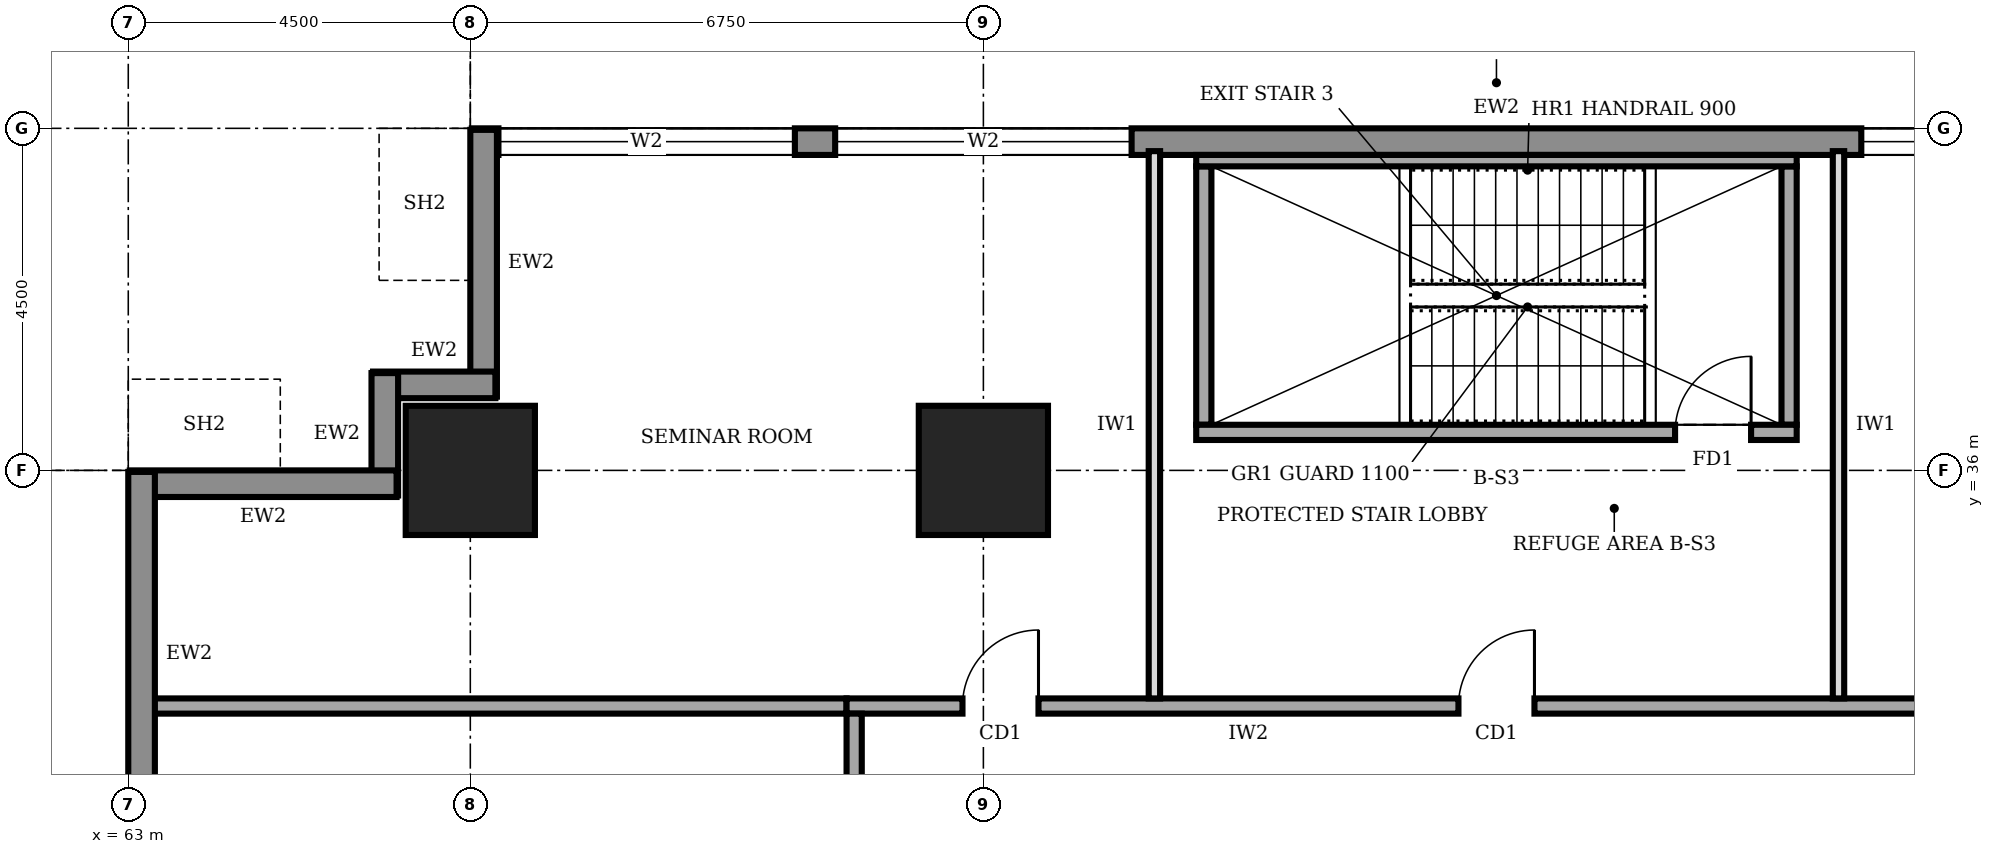
"""IFC4 building model, lengths in metres.
Left out: names, types, materials, properties, quantities, classifications, styles, units other than length and angle.
Written with IfcOpenShell. Run it as: python <this file> out.ifc"""

import sys

from ifc_helpers import new_model, si_unit, direction, frame, frame_2d, origin, origin_2d, place, context, subcontext, project, spatial, rectangle, extrude, element, fill, save


model = new_model("IFC4")
c1 = context("Model", 3, precision=1e-05, world=origin(), true_north=direction((0.0, 1.0)))
c2 = subcontext(c1, "Body", "Model", "MODEL_VIEW")
j1 = project(units=[si_unit("LENGTHUNIT", "METRE"), si_unit("PLANEANGLEUNIT", "RADIAN")], contexts=[c1])
p1 = place(None, origin())
s1 = spatial("IfcSite", under=j1, at=p1, CompositionType="ELEMENT")
p2 = place(p1, origin())
s2 = spatial("IfcBuilding", under=s1, at=p2, CompositionType="ELEMENT")
p3 = place(p2, frame((0.0, 0.0, 69.0)))
s3 = spatial("IfcBuildingStorey", under=s2, at=p3, CompositionType="ELEMENT", Elevation=69.0)
for number, where, z_axis, x_axis in (
    (1, (67.5, 36.0, 0.0), (0.0, 0.0, 1.0), (1.0, 0.0, 0.0)),
    (2, (74.25, 36.0, 0.0), (0.0, 0.0, 1.0), (1.0, 0.0, 0.0)),
):
    element("IfcColumn", number, at=place(p3, frame(where, z_axis=z_axis, x_axis=x_axis)), inside=s3, PredefinedType="COLUMN", context=c2, shape_type="SweptSolid", body=[
        extrude(rectangle(XDim=1.7, YDim=1.7, at=origin_2d()), origin(), (0.0, 0.0, 1.0), 4.0),
    ])
p4 = place(p3, frame((94.48, 40.325, 0.0), z_axis=(0.0, 0.0, 1.0), x_axis=(-1.0, 0.0, 0.0)))
e3 = element("IfcWall", 3, at=p4, inside=s3, PredefinedType="STANDARD", context=c2, shape_type="SweptSolid", body=[
    extrude(rectangle(XDim=26.96, YDim=0.35, at=frame_2d((13.48, 0.0))), origin(), (0.0, 0.0, 1.0), 3.75),
])
p5 = place(p4, frame((22.71, 0.0, 0.6)))
e4 = element("IfcOpeningElement", 4, at=p5, cuts=e3, PredefinedType="OPENING", context=c2, shape_type="SweptSolid", body=[
    extrude(rectangle(XDim=3.9, YDim=2.6, at=frame_2d((1.95, 1.3))), frame((0.0, 0.185, 0.0), z_axis=(0.0, -1.0, 0.0), x_axis=(1.0, 0.0, 0.0)), (0.0, 0.0, 1.0), 0.37),
])
p6 = place(p4, frame((18.28, 0.0, 0.6)))
e5 = element("IfcOpeningElement", 5, at=p6, cuts=e3, PredefinedType="OPENING", context=c2, shape_type="SweptSolid", body=[
    extrude(rectangle(XDim=3.9, YDim=2.6, at=frame_2d((1.95, 1.3))), frame((0.0, 0.185, 0.0), z_axis=(0.0, -1.0, 0.0), x_axis=(1.0, 0.0, 0.0)), (0.0, 0.0, 1.0), 0.37),
])
p7 = place(p4, frame((4.78, 0.0, 0.6)))
e6 = element("IfcOpeningElement", 6, at=p7, cuts=e3, PredefinedType="OPENING", context=c2, shape_type="SweptSolid", body=[
    extrude(rectangle(XDim=3.9, YDim=2.6, at=frame_2d((1.95, 1.3))), frame((0.0, 0.185, 0.0), z_axis=(0.0, -1.0, 0.0), x_axis=(1.0, 0.0, 0.0)), (0.0, 0.0, 1.0), 0.37),
])
p8 = place(p3, frame((67.675, 40.48, 0.0), z_axis=(0.0, 0.0, 1.0), x_axis=(0.0, -1.0, 0.0)))
e7 = element("IfcWall", 7, at=p8, inside=s3, PredefinedType="STANDARD", context=c2, shape_type="SweptSolid", body=[
    extrude(rectangle(XDim=3.51, YDim=0.35, at=frame_2d((1.755, 0.0))), origin(), (0.0, 0.0, 1.0), 2.85),
])
for number, where, z_axis, x_axis in (
    (8, (67.83, 37.125, 0.0), (0.0, 0.0, 1.0), (-1.0, 0.0, 0.0)),
    (9, (66.375, 37.28, 0.0), (0.0, 0.0, 1.0), (0.0, -1.0, 0.0)),
):
    element("IfcWall", number, at=place(p3, frame(where, z_axis=z_axis, x_axis=x_axis)), inside=s3, PredefinedType="STANDARD", context=c2, shape_type="SweptSolid", body=[
        extrude(rectangle(XDim=1.61, YDim=0.35, at=frame_2d((0.805, 0.0))), origin(), (0.0, 0.0, 1.0), 3.75),
    ])
p9 = place(p3, frame((66.53, 35.825, 0.0), z_axis=(0.0, 0.0, 1.0), x_axis=(-1.0, 0.0, 0.0)))
e10 = element("IfcWall", 10, at=p9, inside=s3, PredefinedType="STANDARD", context=c2, shape_type="SweptSolid", body=[
    extrude(rectangle(XDim=3.51, YDim=0.35, at=frame_2d((1.755, 0.0))), origin(), (0.0, 0.0, 1.0), 2.85),
])
p10 = place(p3, frame((63.175, 35.98, 0.0), z_axis=(0.0, 0.0, 1.0), x_axis=(0.0, -1.0, 0.0)))
e11 = element("IfcWall", 11, at=p10, inside=s3, PredefinedType="STANDARD", context=c2, shape_type="SweptSolid", body=[
    extrude(rectangle(XDim=31.46, YDim=0.35, at=frame_2d((15.73, 0.0))), origin(), (0.0, 0.0, 1.0), 3.75),
])
p11 = place(p10, frame((27.21, 0.0, 0.6)))
e12 = element("IfcOpeningElement", 12, at=p11, cuts=e11, PredefinedType="OPENING", context=c2, shape_type="SweptSolid", body=[
    extrude(rectangle(XDim=3.9, YDim=2.6, at=frame_2d((1.95, 1.3))), frame((0.0, 0.185, 0.0), z_axis=(0.0, -1.0, 0.0), x_axis=(1.0, 0.0, 0.0)), (0.0, 0.0, 1.0), 0.37),
])
p12 = place(p10, frame((22.78, 0.0, 0.6)))
e13 = element("IfcOpeningElement", 13, at=p12, cuts=e11, PredefinedType="OPENING", context=c2, shape_type="SweptSolid", body=[
    extrude(rectangle(XDim=3.9, YDim=2.6, at=frame_2d((1.95, 1.3))), frame((0.0, 0.185, 0.0), z_axis=(0.0, -1.0, 0.0), x_axis=(1.0, 0.0, 0.0)), (0.0, 0.0, 1.0), 0.37),
])
p13 = place(p10, frame((18.28, 0.0, 0.6)))
e14 = element("IfcOpeningElement", 14, at=p13, cuts=e11, PredefinedType="OPENING", context=c2, shape_type="SweptSolid", body=[
    extrude(rectangle(XDim=3.9, YDim=2.6, at=frame_2d((1.95, 1.3))), frame((0.0, 0.185, 0.0), z_axis=(0.0, -1.0, 0.0), x_axis=(1.0, 0.0, 0.0)), (0.0, 0.0, 1.0), 0.37),
])
p14 = place(p10, frame((13.78, 0.0, 0.6)))
e15 = element("IfcOpeningElement", 15, at=p14, cuts=e11, PredefinedType="OPENING", context=c2, shape_type="SweptSolid", body=[
    extrude(rectangle(XDim=3.9, YDim=2.6, at=frame_2d((1.95, 1.3))), frame((0.0, 0.185, 0.0), z_axis=(0.0, -1.0, 0.0), x_axis=(1.0, 0.0, 0.0)), (0.0, 0.0, 1.0), 0.37),
])
p15 = place(p10, frame((9.28, 0.0, 0.6)))
e16 = element("IfcOpeningElement", 16, at=p15, cuts=e11, PredefinedType="OPENING", context=c2, shape_type="SweptSolid", body=[
    extrude(rectangle(XDim=3.9, YDim=2.6, at=frame_2d((1.95, 1.3))), frame((0.0, 0.185, 0.0), z_axis=(0.0, -1.0, 0.0), x_axis=(1.0, 0.0, 0.0)), (0.0, 0.0, 1.0), 0.37),
])
p16 = place(p10, frame((4.78, 0.0, 0.6)))
e17 = element("IfcOpeningElement", 17, at=p16, cuts=e11, PredefinedType="OPENING", context=c2, shape_type="SweptSolid", body=[
    extrude(rectangle(XDim=3.9, YDim=2.6, at=frame_2d((1.95, 1.3))), frame((0.0, 0.185, 0.0), z_axis=(0.0, -1.0, 0.0), x_axis=(1.0, 0.0, 0.0)), (0.0, 0.0, 1.0), 0.37),
])
p17 = place(p3, frame((89.35, 32.9, 0.0), z_axis=(0.0, 0.0, 1.0), x_axis=(-1.0, 0.0, 0.0)))
e18 = element("IfcWall", 18, at=p17, inside=s3, PredefinedType="SOLIDWALL", context=c2, shape_type="SweptSolid", body=[
    extrude(rectangle(XDim=16.9, YDim=0.2, at=frame_2d((8.45, 0.0))), origin(), (0.0, 0.0, 1.0), 3.75),
])
p18 = place(p17, frame((14.375, 0.0, 0.0)))
e19 = element("IfcOpeningElement", 19, at=p18, cuts=e18, PredefinedType="OPENING", context=c2, shape_type="SweptSolid", body=[
    extrude(rectangle(XDim=1.0, YDim=2.1, at=frame_2d((0.5, 1.05))), frame((0.0, 0.11, 0.0), z_axis=(0.0, -1.0, 0.0), x_axis=(1.0, 0.0, 0.0)), (0.0, 0.0, 1.0), 0.22),
])
p19 = place(p17, frame((7.85, 0.0, 0.0)))
e20 = element("IfcOpeningElement", 20, at=p19, cuts=e18, PredefinedType="OPENING", context=c2, shape_type="SweptSolid", body=[
    extrude(rectangle(XDim=1.0, YDim=2.1, at=frame_2d((0.5, 1.05))), frame((0.0, 0.11, 0.0), z_axis=(0.0, -1.0, 0.0), x_axis=(1.0, 0.0, 0.0)), (0.0, 0.0, 1.0), 0.22),
])
p20 = place(p17, frame((1.325, 0.0, 0.0)))
e21 = element("IfcOpeningElement", 21, at=p20, cuts=e18, PredefinedType="OPENING", context=c2, shape_type="SweptSolid", body=[
    extrude(rectangle(XDim=1.0, YDim=2.1, at=frame_2d((0.5, 1.05))), frame((0.0, 0.11, 0.0), z_axis=(0.0, -1.0, 0.0), x_axis=(1.0, 0.0, 0.0)), (0.0, 0.0, 1.0), 0.22),
])
p21 = place(p3, frame((72.55, 32.8, 0.0), z_axis=(0.0, 0.0, 1.0), x_axis=(0.0, -1.0, 0.0)))
e22 = element("IfcWall", 22, at=p21, inside=s3, PredefinedType="SOLIDWALL", context=c2, shape_type="SweptSolid", body=[
    extrude(rectangle(XDim=25.3, YDim=0.2, at=frame_2d((12.65, 0.0))), origin(), (0.0, 0.0, 1.0), 3.75),
])
p22 = place(p21, frame((19.55, 0.0, 0.0)))
e23 = element("IfcOpeningElement", 23, at=p22, cuts=e22, PredefinedType="OPENING", context=c2, shape_type="SweptSolid", body=[
    extrude(rectangle(XDim=1.0, YDim=2.1, at=frame_2d((0.5, 1.05))), frame((0.0, 0.11, 0.0), z_axis=(0.0, -1.0, 0.0), x_axis=(1.0, 0.0, 0.0)), (0.0, 0.0, 1.0), 0.22),
])
p23 = place(p21, frame((6.4, 0.0, 0.0)))
e24 = element("IfcOpeningElement", 24, at=p23, cuts=e22, PredefinedType="OPENING", context=c2, shape_type="SweptSolid", body=[
    extrude(rectangle(XDim=1.8, YDim=2.1, at=frame_2d((0.9, 1.05))), frame((0.0, 0.11, 0.0), z_axis=(0.0, -1.0, 0.0), x_axis=(1.0, 0.0, 0.0)), (0.0, 0.0, 1.0), 0.22),
])
p24 = place(p3, frame((63.3, 32.9, 0.0), z_axis=(0.0, 0.0, 1.0), x_axis=(1.0, 0.0, 0.0)))
e25 = element("IfcWall", 25, at=p24, inside=s3, PredefinedType="SOLIDWALL", context=c2, shape_type="SweptSolid", body=[
    extrude(rectangle(XDim=9.15, YDim=0.2, at=frame_2d((4.575, 0.0))), origin(), (0.0, 0.0, 1.0), 3.75),
])
for number, where, z_axis, x_axis in (
    (26, (76.5, 33.0, 0.0), (0.0, 0.0, 1.0), (0.0, 1.0, 0.0)),
    (27, (85.5, 33.0, 0.0), (0.0, 0.0, 1.0), (0.0, 1.0, 0.0)),
):
    element("IfcWall", number, at=place(p3, frame(where, z_axis=z_axis, x_axis=x_axis)), inside=s3, PredefinedType="PARTITIONING", context=c2, shape_type="SweptSolid", body=[
        extrude(rectangle(XDim=7.2, YDim=0.15, at=frame_2d((3.6, 0.0))), origin(), (0.0, 0.0, 1.0), 3.75),
    ])
p25 = place(p3, frame((77.05, 36.5, 0.0), z_axis=(0.0, 0.0, 1.0), x_axis=(1.0, 0.0, 0.0)))
e28 = element("IfcWall", 28, at=p25, inside=s3, PredefinedType="SOLIDWALL", context=c2, shape_type="SweptSolid", body=[
    extrude(rectangle(XDim=7.9, YDim=0.2, at=frame_2d((3.95, 0.0))), origin(), (0.0, 0.0, 1.0), 3.75),
])
p26 = place(p25, frame((6.3, 0.0, 0.0)))
e29 = element("IfcOpeningElement", 29, at=p26, cuts=e28, PredefinedType="OPENING", context=c2, shape_type="SweptSolid", body=[
    extrude(rectangle(XDim=1.0, YDim=2.1, at=frame_2d((0.5, 1.05))), frame((0.0, 0.11, 0.0), z_axis=(0.0, -1.0, 0.0), x_axis=(1.0, 0.0, 0.0)), (0.0, 0.0, 1.0), 0.22),
])
p27 = place(p3, frame((77.05, 40.075, 0.0), z_axis=(0.0, 0.0, 1.0), x_axis=(1.0, 0.0, 0.0)))
e30 = element("IfcWall", 30, at=p27, inside=s3, PredefinedType="SOLIDWALL", context=c2, shape_type="SweptSolid", body=[
    extrude(rectangle(XDim=7.9, YDim=0.15, at=frame_2d((3.95, 0.0))), origin(), (0.0, 0.0, 1.0), 3.75),
])
for number, where, z_axis, x_axis in (
    (31, (77.15, 36.6, 0.0), (0.0, 0.0, 1.0), (0.0, 1.0, 0.0)),
    (32, (84.85, 36.6, 0.0), (0.0, 0.0, 1.0), (0.0, 1.0, 0.0)),
):
    element("IfcWall", number, at=place(p3, frame(where, z_axis=z_axis, x_axis=x_axis)), inside=s3, PredefinedType="SOLIDWALL", context=c2, shape_type="SweptSolid", body=[
        extrude(rectangle(XDim=3.4, YDim=0.2, at=frame_2d((1.7, 0.0))), origin(), (0.0, 0.0, 1.0), 3.75),
    ])
p28 = place(p5, origin())
e33 = element("IfcWindow", 33, at=p28, inside=s3, PartitioningType="SINGLE_PANEL", PredefinedType="WINDOW", context=c2, shape_type="SweptSolid", body=[
    extrude(rectangle(XDim=3.9, YDim=2.6, at=frame_2d((1.95, 1.3))), frame((0.0, 0.03, 0.0), z_axis=(0.0, -1.0, 0.0), x_axis=(1.0, 0.0, 0.0)), (0.0, 0.0, 1.0), 0.06),
])
fill(e4, e33)
p29 = place(p6, origin())
e34 = element("IfcWindow", 34, at=p29, inside=s3, PartitioningType="SINGLE_PANEL", PredefinedType="WINDOW", context=c2, shape_type="SweptSolid", body=[
    extrude(rectangle(XDim=3.9, YDim=2.6, at=frame_2d((1.95, 1.3))), frame((0.0, 0.03, 0.0), z_axis=(0.0, -1.0, 0.0), x_axis=(1.0, 0.0, 0.0)), (0.0, 0.0, 1.0), 0.06),
])
fill(e5, e34)
p30 = place(p7, origin())
e35 = element("IfcWindow", 35, at=p30, inside=s3, PartitioningType="SINGLE_PANEL", PredefinedType="WINDOW", context=c2, shape_type="SweptSolid", body=[
    extrude(rectangle(XDim=3.9, YDim=2.6, at=frame_2d((1.95, 1.3))), frame((0.0, 0.03, 0.0), z_axis=(0.0, -1.0, 0.0), x_axis=(1.0, 0.0, 0.0)), (0.0, 0.0, 1.0), 0.06),
])
fill(e6, e35)
p31 = place(p18, frame((1.0, 0.0, 0.0), z_axis=(0.0, 0.0, 1.0), x_axis=(-1.0, 0.0, 0.0)))
e36 = element("IfcDoor", 36, at=p31, inside=s3, OperationType="SINGLE_SWING_RIGHT", PredefinedType="DOOR", context=c2, shape_type="SweptSolid", body=[
    extrude(rectangle(XDim=1.0, YDim=2.1, at=frame_2d((0.5, 1.05))), frame((0.0, 0.025, 0.0), z_axis=(0.0, -1.0, 0.0), x_axis=(1.0, 0.0, 0.0)), (0.0, 0.0, 1.0), 0.05),
])
fill(e19, e36)
p32 = place(p19, frame((1.0, 0.0, 0.0), z_axis=(0.0, 0.0, 1.0), x_axis=(-1.0, 0.0, 0.0)))
e37 = element("IfcDoor", 37, at=p32, inside=s3, OperationType="SINGLE_SWING_RIGHT", PredefinedType="DOOR", context=c2, shape_type="SweptSolid", body=[
    extrude(rectangle(XDim=1.0, YDim=2.1, at=frame_2d((0.5, 1.05))), frame((0.0, 0.025, 0.0), z_axis=(0.0, -1.0, 0.0), x_axis=(1.0, 0.0, 0.0)), (0.0, 0.0, 1.0), 0.05),
])
fill(e20, e37)
p33 = place(p26, origin())
e38 = element("IfcDoor", 38, at=p33, inside=s3, OperationType="SINGLE_SWING_RIGHT", PredefinedType="DOOR", context=c2, shape_type="SweptSolid", body=[
    extrude(rectangle(XDim=1.0, YDim=2.1, at=frame_2d((0.5, 1.05))), frame((0.0, 0.025, 0.0), z_axis=(0.0, -1.0, 0.0), x_axis=(1.0, 0.0, 0.0)), (0.0, 0.0, 1.0), 0.05),
])
fill(e29, e38)
save(model, sys.argv[1])
